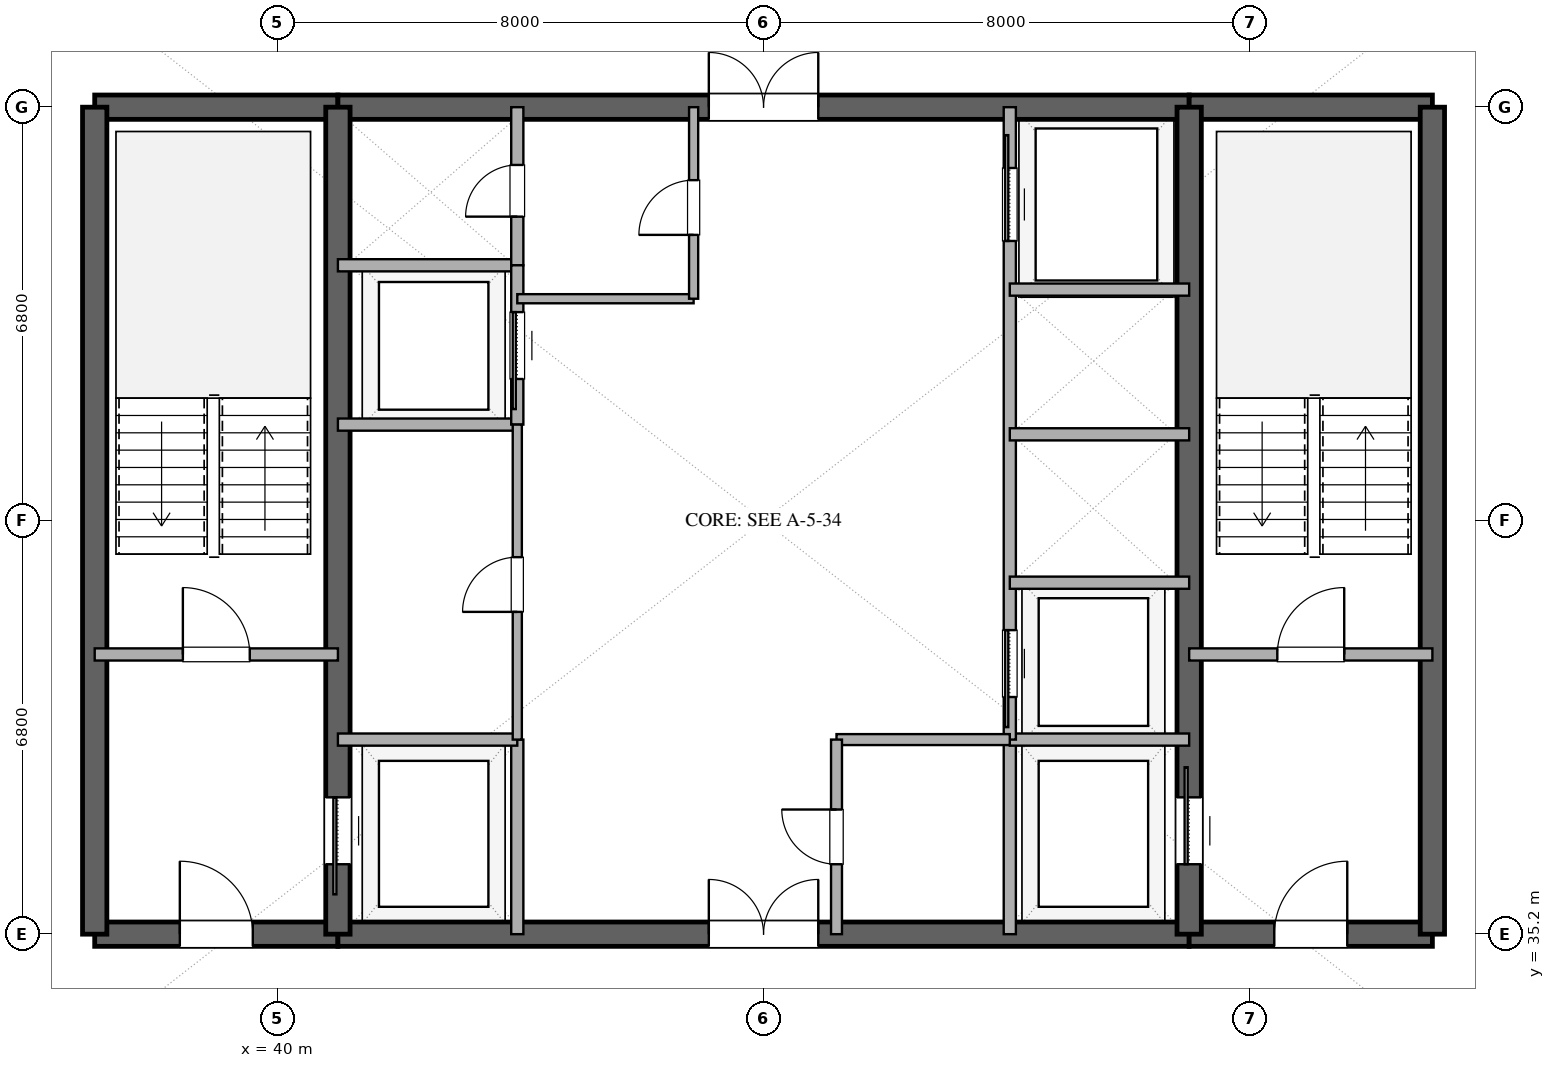
"""IFC4 building model, lengths in metres.
Left out: names, types, materials, properties, quantities, classifications, styles, units other than length and angle.
Written with IfcOpenShell. Run it as: python <this file> out.ifc"""

import sys

from ifc_helpers import new_model, si_unit, direction, frame, frame_2d, origin, place, context, subcontext, project, spatial, rectangle, extrude, element, fill, save


model = new_model("IFC4")
c1 = context("Model", 3, precision=1e-05, world=origin(), true_north=direction((0.0, 1.0)))
c2 = subcontext(c1, "Body", "Model", "MODEL_VIEW")
j1 = project(units=[si_unit("LENGTHUNIT", "METRE"), si_unit("PLANEANGLEUNIT", "RADIAN")], contexts=[c1])
p1 = place(None, origin())
s1 = spatial("IfcSite", under=j1, at=p1, CompositionType="ELEMENT")
p2 = place(p1, origin())
s2 = spatial("IfcBuilding", under=s1, at=p2, CompositionType="ELEMENT")
p3 = place(p2, frame((0.0, 0.0, 228.0)))
s3 = spatial("IfcBuildingStorey", under=s2, at=p3, CompositionType="ELEMENT", Elevation=228.0)
p4 = place(p3, frame((37.0, 35.2, 0.0), z_axis=(0.0, 0.0, 1.0), x_axis=(1.0, 0.0, 0.0)))
e1 = element("IfcWall", 1, at=p4, inside=s3, PredefinedType="SHEAR", context=c2, shape_type="SweptSolid", body=[
    extrude(rectangle(XDim=4.0, YDim=0.4, at=frame_2d((2.0, 0.0))), origin(), (0.0, 0.0, 1.0), 3.36),
])
p5 = place(p4, frame((1.4, 0.0, 0.0)))
e2 = element("IfcOpeningElement", 2, at=p5, cuts=e1, PredefinedType="OPENING", context=c2, shape_type="SweptSolid", body=[
    extrude(rectangle(XDim=1.2, YDim=2.15, at=frame_2d((0.6, 1.075))), frame((0.0, 0.21, 0.0), z_axis=(0.0, -1.0, 0.0), x_axis=(1.0, 0.0, 0.0)), (0.0, 0.0, 1.0), 0.42),
])
p6 = place(p3, frame((41.0, 35.2, 0.0), z_axis=(0.0, 0.0, 1.0), x_axis=(1.0, 0.0, 0.0)))
e3 = element("IfcWall", 3, at=p6, inside=s3, PredefinedType="SHEAR", context=c2, shape_type="SweptSolid", body=[
    extrude(rectangle(XDim=14.0, YDim=0.4, at=frame_2d((7.0, 0.0))), origin(), (0.0, 0.0, 1.0), 3.36),
])
p7 = place(p6, frame((6.1, 0.0, 0.0)))
e4 = element("IfcOpeningElement", 4, at=p7, cuts=e3, PredefinedType="OPENING", context=c2, shape_type="SweptSolid", body=[
    extrude(rectangle(XDim=1.8, YDim=2.25, at=frame_2d((0.9, 1.125))), frame((0.0, 0.21, 0.0), z_axis=(0.0, -1.0, 0.0), x_axis=(1.0, 0.0, 0.0)), (0.0, 0.0, 1.0), 0.42),
])
p8 = place(p3, frame((55.0, 35.2, 0.0), z_axis=(0.0, 0.0, 1.0), x_axis=(1.0, 0.0, 0.0)))
e5 = element("IfcWall", 5, at=p8, inside=s3, PredefinedType="SHEAR", context=c2, shape_type="SweptSolid", body=[
    extrude(rectangle(XDim=4.0, YDim=0.4, at=frame_2d((2.0, 0.0))), origin(), (0.0, 0.0, 1.0), 3.36),
])
p9 = place(p8, frame((1.4, 0.0, 0.0)))
e6 = element("IfcOpeningElement", 6, at=p9, cuts=e5, PredefinedType="OPENING", context=c2, shape_type="SweptSolid", body=[
    extrude(rectangle(XDim=1.2, YDim=2.15, at=frame_2d((0.6, 1.075))), frame((0.0, 0.21, 0.0), z_axis=(0.0, -1.0, 0.0), x_axis=(1.0, 0.0, 0.0)), (0.0, 0.0, 1.0), 0.42),
])
p10 = place(p3, frame((37.0, 48.8, 0.0), z_axis=(0.0, 0.0, 1.0), x_axis=(1.0, 0.0, 0.0)))
e7 = element("IfcWall", 7, at=p10, inside=s3, PredefinedType="SHEAR", context=c2, shape_type="SweptSolid", body=[
    extrude(rectangle(XDim=4.0, YDim=0.4, at=frame_2d((2.0, 0.0))), origin(), (0.0, 0.0, 1.0), 3.36),
])
p11 = place(p3, frame((41.0, 48.8, 0.0), z_axis=(0.0, 0.0, 1.0), x_axis=(1.0, 0.0, 0.0)))
e8 = element("IfcWall", 8, at=p11, inside=s3, PredefinedType="SHEAR", context=c2, shape_type="SweptSolid", body=[
    extrude(rectangle(XDim=14.0, YDim=0.4, at=frame_2d((7.0, 0.0))), origin(), (0.0, 0.0, 1.0), 3.36),
])
p12 = place(p11, frame((6.1, 0.0, 0.0)))
e9 = element("IfcOpeningElement", 9, at=p12, cuts=e8, PredefinedType="OPENING", context=c2, shape_type="SweptSolid", body=[
    extrude(rectangle(XDim=1.8, YDim=2.25, at=frame_2d((0.9, 1.125))), frame((0.0, 0.21, 0.0), z_axis=(0.0, -1.0, 0.0), x_axis=(1.0, 0.0, 0.0)), (0.0, 0.0, 1.0), 0.42),
])
p13 = place(p3, frame((55.0, 48.8, 0.0), z_axis=(0.0, 0.0, 1.0), x_axis=(1.0, 0.0, 0.0)))
e10 = element("IfcWall", 10, at=p13, inside=s3, PredefinedType="SHEAR", context=c2, shape_type="SweptSolid", body=[
    extrude(rectangle(XDim=4.0, YDim=0.4, at=frame_2d((2.0, 0.0))), origin(), (0.0, 0.0, 1.0), 3.36),
])
for number, where, z_axis, x_axis in (
    (11, (37.0, 35.2, 0.0), (0.0, 0.0, 1.0), (0.0, 1.0, 0.0)),
    (12, (59.0, 35.2, 0.0), (0.0, 0.0, 1.0), (0.0, 1.0, 0.0)),
):
    element("IfcWall", number, at=place(p3, frame(where, z_axis=z_axis, x_axis=x_axis)), inside=s3, PredefinedType="SHEAR", context=c2, shape_type="SweptSolid", body=[
        extrude(rectangle(XDim=13.6, YDim=0.4, at=frame_2d((6.8, 0.0))), origin(), (0.0, 0.0, 1.0), 3.36),
    ])
p14 = place(p3, frame((41.0, 35.2, 0.0), z_axis=(0.0, 0.0, 1.0), x_axis=(0.0, 1.0, 0.0)))
e13 = element("IfcWall", 13, at=p14, inside=s3, PredefinedType="SHEAR", context=c2, shape_type="SweptSolid", body=[
    extrude(rectangle(XDim=13.6, YDim=0.4, at=frame_2d((6.8, 0.0))), origin(), (0.0, 0.0, 1.0), 3.36),
])
p15 = place(p14, frame((1.15, 0.0, 0.0)))
e14 = element("IfcOpeningElement", 14, at=p15, cuts=e13, PredefinedType="OPENING", context=c2, shape_type="SweptSolid", body=[
    extrude(rectangle(XDim=1.1, YDim=2.2, at=frame_2d((0.55, 1.1))), frame((0.0, 0.21, 0.0), z_axis=(0.0, -1.0, 0.0), x_axis=(1.0, 0.0, 0.0)), (0.0, 0.0, 1.0), 0.42),
])
p16 = place(p3, frame((55.0, 35.2, 0.0), z_axis=(0.0, 0.0, 1.0), x_axis=(0.0, 1.0, 0.0)))
e15 = element("IfcWall", 15, at=p16, inside=s3, PredefinedType="SHEAR", context=c2, shape_type="SweptSolid", body=[
    extrude(rectangle(XDim=13.6, YDim=0.4, at=frame_2d((6.8, 0.0))), origin(), (0.0, 0.0, 1.0), 3.36),
])
p17 = place(p16, frame((1.15, 0.0, 0.0)))
e16 = element("IfcOpeningElement", 16, at=p17, cuts=e15, PredefinedType="OPENING", context=c2, shape_type="SweptSolid", body=[
    extrude(rectangle(XDim=1.1, YDim=2.2, at=frame_2d((0.55, 1.1))), frame((0.0, 0.21, 0.0), z_axis=(0.0, -1.0, 0.0), x_axis=(1.0, 0.0, 0.0)), (0.0, 0.0, 1.0), 0.42),
])
p18 = place(p3, frame((37.0, 39.8, 0.0), z_axis=(0.0, 0.0, 1.0), x_axis=(1.0, 0.0, 0.0)))
e17 = element("IfcWall", 17, at=p18, inside=s3, PredefinedType="SOLIDWALL", context=c2, shape_type="SweptSolid", body=[
    extrude(rectangle(XDim=4.0, YDim=0.2, at=frame_2d((2.0, 0.0))), origin(), (0.0, 0.0, 1.0), 2.72),
])
p19 = place(p18, frame((1.45, 0.0, 0.0)))
e18 = element("IfcOpeningElement", 18, at=p19, cuts=e17, PredefinedType="OPENING", context=c2, shape_type="SweptSolid", body=[
    extrude(rectangle(XDim=1.1, YDim=2.15, at=frame_2d((0.55, 1.075))), frame((0.0, 0.11, 0.0), z_axis=(0.0, -1.0, 0.0), x_axis=(1.0, 0.0, 0.0)), (0.0, 0.0, 1.0), 0.22),
])
p20 = place(p3, frame((55.0, 39.8, 0.0), z_axis=(0.0, 0.0, 1.0), x_axis=(1.0, 0.0, 0.0)))
e19 = element("IfcWall", 19, at=p20, inside=s3, PredefinedType="SOLIDWALL", context=c2, shape_type="SweptSolid", body=[
    extrude(rectangle(XDim=4.0, YDim=0.2, at=frame_2d((2.0, 0.0))), origin(), (0.0, 0.0, 1.0), 2.72),
])
p21 = place(p20, frame((1.45, 0.0, 0.0)))
e20 = element("IfcOpeningElement", 20, at=p21, cuts=e19, PredefinedType="OPENING", context=c2, shape_type="SweptSolid", body=[
    extrude(rectangle(XDim=1.1, YDim=2.15, at=frame_2d((0.55, 1.075))), frame((0.0, 0.11, 0.0), z_axis=(0.0, -1.0, 0.0), x_axis=(1.0, 0.0, 0.0)), (0.0, 0.0, 1.0), 0.22),
])
p22 = place(p3, frame((43.95, 35.2, 0.0), z_axis=(0.0, 0.0, 1.0), x_axis=(0.0, 1.0, 0.0)))
e21 = element("IfcWall", 21, at=p22, inside=s3, PredefinedType="SOLIDWALL", context=c2, shape_type="SweptSolid", body=[
    extrude(rectangle(XDim=3.2, YDim=0.2, at=frame_2d((1.6, 0.0))), origin(), (0.0, 0.0, 1.0), 2.72),
])
p23 = place(p3, frame((41.0, 38.4, 0.0), z_axis=(0.0, 0.0, 1.0), x_axis=(1.0, 0.0, 0.0)))
e22 = element("IfcWall", 22, at=p23, inside=s3, PredefinedType="SOLIDWALL", context=c2, shape_type="SweptSolid", body=[
    extrude(rectangle(XDim=2.95, YDim=0.2, at=frame_2d((1.475, 0.0))), origin(), (0.0, 0.0, 1.0), 2.72),
])
p24 = place(p3, frame((52.05, 35.2, 0.0), z_axis=(0.0, 0.0, 1.0), x_axis=(0.0, 1.0, 0.0)))
e23 = element("IfcWall", 23, at=p24, inside=s3, PredefinedType="SOLIDWALL", context=c2, shape_type="SweptSolid", body=[
    extrude(rectangle(XDim=3.2, YDim=0.2, at=frame_2d((1.6, 0.0))), origin(), (0.0, 0.0, 1.0), 2.72),
])
for number, where, z_axis, x_axis in (
    (24, (52.05, 38.4, 0.0), (0.0, 0.0, 1.0), (1.0, 0.0, 0.0)),
    (25, (41.0, 46.2, 0.0), (0.0, 0.0, 1.0), (1.0, 0.0, 0.0)),
):
    element("IfcWall", number, at=place(p3, frame(where, z_axis=z_axis, x_axis=x_axis)), inside=s3, PredefinedType="SOLIDWALL", context=c2, shape_type="SweptSolid", body=[
        extrude(rectangle(XDim=2.95, YDim=0.2, at=frame_2d((1.475, 0.0))), origin(), (0.0, 0.0, 1.0), 2.72),
    ])
p25 = place(p3, frame((43.95, 46.2, 0.0), z_axis=(0.0, 0.0, 1.0), x_axis=(0.0, 1.0, 0.0)))
e26 = element("IfcWall", 26, at=p25, inside=s3, PredefinedType="SOLIDWALL", context=c2, shape_type="SweptSolid", body=[
    extrude(rectangle(XDim=2.6, YDim=0.2, at=frame_2d((1.3, 0.0))), origin(), (0.0, 0.0, 1.0), 2.72),
])
p26 = place(p25, frame((0.8, 0.0, 0.0)))
e27 = element("IfcOpeningElement", 27, at=p26, cuts=e26, PredefinedType="OPENING", context=c2, shape_type="SweptSolid", body=[
    extrude(rectangle(XDim=0.85, YDim=2.15, at=frame_2d((0.425, 1.075))), frame((0.0, 0.11, 0.0), z_axis=(0.0, -1.0, 0.0), x_axis=(1.0, 0.0, 0.0)), (0.0, 0.0, 1.0), 0.22),
])
p27 = place(p3, frame((41.0, 43.58, 0.0), z_axis=(0.0, 0.0, 1.0), x_axis=(1.0, 0.0, 0.0)))
e28 = element("IfcWall", 28, at=p27, inside=s3, PredefinedType="SOLIDWALL", context=c2, shape_type="SweptSolid", body=[
    extrude(rectangle(XDim=2.95, YDim=0.2, at=frame_2d((1.475, 0.0))), origin(), (0.0, 0.0, 1.0), 2.72),
])
p28 = place(p3, frame((43.95, 43.58, 0.0), z_axis=(0.0, 0.0, 1.0), x_axis=(0.0, 1.0, 0.0)))
e29 = element("IfcWall", 29, at=p28, inside=s3, PredefinedType="SOLIDWALL", context=c2, shape_type="SweptSolid", body=[
    extrude(rectangle(XDim=2.62, YDim=0.2, at=frame_2d((1.31, 0.0))), origin(), (0.0, 0.0, 1.0), 2.72),
])
p29 = place(p28, frame((0.75, 0.0, 0.0)))
e30 = element("IfcOpeningElement", 30, at=p29, cuts=e29, PredefinedType="OPENING", context=c2, shape_type="SweptSolid", body=[
    extrude(rectangle(XDim=1.1, YDim=2.2, at=frame_2d((0.55, 1.1))), frame((0.0, 0.11, 0.0), z_axis=(0.0, -1.0, 0.0), x_axis=(1.0, 0.0, 0.0)), (0.0, 0.0, 1.0), 0.22),
])
p30 = place(p3, frame((43.95, 38.4, 0.0), z_axis=(0.0, 0.0, 1.0), x_axis=(0.0, 1.0, 0.0)))
e31 = element("IfcWall", 31, at=p30, inside=s3, PredefinedType="PARTITIONING", context=c2, shape_type="SweptSolid", body=[
    extrude(rectangle(XDim=5.18, YDim=0.15, at=frame_2d((2.59, 0.0))), origin(), (0.0, 0.0, 1.0), 2.72),
])
p31 = place(p30, frame((2.1, 0.0, 0.0)))
e32 = element("IfcOpeningElement", 32, at=p31, cuts=e31, PredefinedType="OPENING", context=c2, shape_type="SweptSolid", body=[
    extrude(rectangle(XDim=0.9, YDim=2.15, at=frame_2d((0.45, 1.075))), frame((0.0, 0.085, 0.0), z_axis=(0.0, -1.0, 0.0), x_axis=(1.0, 0.0, 0.0)), (0.0, 0.0, 1.0), 0.17),
])
p32 = place(p3, frame((52.05, 38.4, 0.0), z_axis=(0.0, 0.0, 1.0), x_axis=(0.0, 1.0, 0.0)))
e33 = element("IfcWall", 33, at=p32, inside=s3, PredefinedType="SOLIDWALL", context=c2, shape_type="SweptSolid", body=[
    extrude(rectangle(XDim=10.4, YDim=0.2, at=frame_2d((5.2, 0.0))), origin(), (0.0, 0.0, 1.0), 2.72),
])
p33 = place(p32, frame((0.7, 0.0, 0.0)))
e34 = element("IfcOpeningElement", 34, at=p33, cuts=e33, PredefinedType="OPENING", context=c2, shape_type="SweptSolid", body=[
    extrude(rectangle(XDim=1.1, YDim=2.2, at=frame_2d((0.55, 1.1))), frame((0.0, 0.11, 0.0), z_axis=(0.0, -1.0, 0.0), x_axis=(1.0, 0.0, 0.0)), (0.0, 0.0, 1.0), 0.22),
])
p34 = place(p32, frame((8.2, 0.0, 0.0)))
e35 = element("IfcOpeningElement", 35, at=p34, cuts=e33, PredefinedType="OPENING", context=c2, shape_type="SweptSolid", body=[
    extrude(rectangle(XDim=1.2, YDim=2.2, at=frame_2d((0.6, 1.1))), frame((0.0, 0.11, 0.0), z_axis=(0.0, -1.0, 0.0), x_axis=(1.0, 0.0, 0.0)), (0.0, 0.0, 1.0), 0.22),
])
for number, where, z_axis, x_axis in (
    (36, (52.05, 40.98, 0.0), (0.0, 0.0, 1.0), (1.0, 0.0, 0.0)),
    (37, (52.05, 43.42, 0.0), (0.0, 0.0, 1.0), (1.0, 0.0, 0.0)),
    (38, (52.05, 45.8, 0.0), (0.0, 0.0, 1.0), (1.0, 0.0, 0.0)),
):
    element("IfcWall", number, at=place(p3, frame(where, z_axis=z_axis, x_axis=x_axis)), inside=s3, PredefinedType="SOLIDWALL", context=c2, shape_type="SweptSolid", body=[
        extrude(rectangle(XDim=2.95, YDim=0.2, at=frame_2d((1.475, 0.0))), origin(), (0.0, 0.0, 1.0), 2.72),
    ])
p35 = place(p3, frame((43.95, 45.65, 0.0), z_axis=(0.0, 0.0, 1.0), x_axis=(1.0, 0.0, 0.0)))
e39 = element("IfcWall", 39, at=p35, inside=s3, PredefinedType="PARTITIONING", context=c2, shape_type="SweptSolid", body=[
    extrude(rectangle(XDim=2.9, YDim=0.15, at=frame_2d((1.45, 0.0))), origin(), (0.0, 0.0, 1.0), 2.72),
])
p36 = place(p3, frame((46.85, 45.65, 0.0), z_axis=(0.0, 0.0, 1.0), x_axis=(0.0, 1.0, 0.0)))
e40 = element("IfcWall", 40, at=p36, inside=s3, PredefinedType="PARTITIONING", context=c2, shape_type="SweptSolid", body=[
    extrude(rectangle(XDim=3.15, YDim=0.15, at=frame_2d((1.575, 0.0))), origin(), (0.0, 0.0, 1.0), 2.72),
])
p37 = place(p36, frame((1.05, 0.0, 0.0)))
e41 = element("IfcOpeningElement", 41, at=p37, cuts=e40, PredefinedType="OPENING", context=c2, shape_type="SweptSolid", body=[
    extrude(rectangle(XDim=0.9, YDim=2.15, at=frame_2d((0.45, 1.075))), frame((0.0, 0.085, 0.0), z_axis=(0.0, -1.0, 0.0), x_axis=(1.0, 0.0, 0.0)), (0.0, 0.0, 1.0), 0.17),
])
p38 = place(p3, frame((49.2, 38.4, 0.0), z_axis=(0.0, 0.0, 1.0), x_axis=(1.0, 0.0, 0.0)))
e42 = element("IfcWall", 42, at=p38, inside=s3, PredefinedType="PLUMBINGWALL", context=c2, shape_type="SweptSolid", body=[
    extrude(rectangle(XDim=2.85, YDim=0.18, at=frame_2d((1.425, 0.0))), origin(), (0.0, 0.0, 1.0), 2.72),
])
p39 = place(p3, frame((49.2, 35.2, 0.0), z_axis=(0.0, 0.0, 1.0), x_axis=(0.0, 1.0, 0.0)))
e43 = element("IfcWall", 43, at=p39, inside=s3, PredefinedType="PLUMBINGWALL", context=c2, shape_type="SweptSolid", body=[
    extrude(rectangle(XDim=3.2, YDim=0.18, at=frame_2d((1.6, 0.0))), origin(), (0.0, 0.0, 1.0), 2.72),
])
p40 = place(p39, frame((1.15, 0.0, 0.0)))
e44 = element("IfcOpeningElement", 44, at=p40, cuts=e43, PredefinedType="OPENING", context=c2, shape_type="SweptSolid", body=[
    extrude(rectangle(XDim=0.9, YDim=2.1, at=frame_2d((0.45, 1.05))), frame((0.0, 0.1, 0.0), z_axis=(0.0, -1.0, 0.0), x_axis=(1.0, 0.0, 0.0)), (0.0, 0.0, 1.0), 0.2),
])
p41 = place(p15, origin())
e45 = element("IfcDoor", 45, at=p41, inside=s3, OperationType="SLIDING_TO_LEFT", PredefinedType="DOOR", context=c2, shape_type="SweptSolid", body=[
    extrude(rectangle(XDim=1.1, YDim=2.2, at=frame_2d((0.55, 1.1))), frame((0.0, 0.025, 0.0), z_axis=(0.0, -1.0, 0.0), x_axis=(1.0, 0.0, 0.0)), (0.0, 0.0, 1.0), 0.05),
])
fill(e14, e45)
p42 = place(p17, origin())
e46 = element("IfcDoor", 46, at=p42, inside=s3, OperationType="SLIDING_TO_RIGHT", PredefinedType="DOOR", context=c2, shape_type="SweptSolid", body=[
    extrude(rectangle(XDim=1.1, YDim=2.2, at=frame_2d((0.55, 1.1))), frame((0.0, 0.025, 0.0), z_axis=(0.0, -1.0, 0.0), x_axis=(1.0, 0.0, 0.0)), (0.0, 0.0, 1.0), 0.05),
])
fill(e16, e46)
p43 = place(p5, origin())
e47 = element("IfcDoor", 47, at=p43, inside=s3, OperationType="SINGLE_SWING_LEFT", PredefinedType="DOOR", context=c2, shape_type="SweptSolid", body=[
    extrude(rectangle(XDim=1.2, YDim=2.15, at=frame_2d((0.6, 1.075))), frame((0.0, 0.025, 0.0), z_axis=(0.0, -1.0, 0.0), x_axis=(1.0, 0.0, 0.0)), (0.0, 0.0, 1.0), 0.05),
])
fill(e2, e47)
p44 = place(p9, origin())
e48 = element("IfcDoor", 48, at=p44, inside=s3, OperationType="SINGLE_SWING_RIGHT", PredefinedType="DOOR", context=c2, shape_type="SweptSolid", body=[
    extrude(rectangle(XDim=1.2, YDim=2.15, at=frame_2d((0.6, 1.075))), frame((0.0, 0.025, 0.0), z_axis=(0.0, -1.0, 0.0), x_axis=(1.0, 0.0, 0.0)), (0.0, 0.0, 1.0), 0.05),
])
fill(e6, e48)
p45 = place(p7, origin())
e49 = element("IfcDoor", 49, at=p45, inside=s3, OperationType="DOUBLE_DOOR_SINGLE_SWING", PredefinedType="DOOR", context=c2, shape_type="SweptSolid", body=[
    extrude(rectangle(XDim=1.8, YDim=2.25, at=frame_2d((0.9, 1.125))), frame((0.0, 0.025, 0.0), z_axis=(0.0, -1.0, 0.0), x_axis=(1.0, 0.0, 0.0)), (0.0, 0.0, 1.0), 0.05),
])
fill(e4, e49)
p46 = place(p12, origin())
e50 = element("IfcDoor", 50, at=p46, inside=s3, OperationType="DOUBLE_DOOR_SINGLE_SWING", PredefinedType="DOOR", context=c2, shape_type="SweptSolid", body=[
    extrude(rectangle(XDim=1.8, YDim=2.25, at=frame_2d((0.9, 1.125))), frame((0.0, 0.025, 0.0), z_axis=(0.0, -1.0, 0.0), x_axis=(1.0, 0.0, 0.0)), (0.0, 0.0, 1.0), 0.05),
])
fill(e9, e50)
p47 = place(p19, origin())
e51 = element("IfcDoor", 51, at=p47, inside=s3, OperationType="SINGLE_SWING_LEFT", PredefinedType="DOOR", context=c2, shape_type="SweptSolid", body=[
    extrude(rectangle(XDim=1.1, YDim=2.15, at=frame_2d((0.55, 1.075))), frame((0.0, 0.025, 0.0), z_axis=(0.0, -1.0, 0.0), x_axis=(1.0, 0.0, 0.0)), (0.0, 0.0, 1.0), 0.05),
])
fill(e18, e51)
p48 = place(p21, origin())
e52 = element("IfcDoor", 52, at=p48, inside=s3, OperationType="SINGLE_SWING_RIGHT", PredefinedType="DOOR", context=c2, shape_type="SweptSolid", body=[
    extrude(rectangle(XDim=1.1, YDim=2.15, at=frame_2d((0.55, 1.075))), frame((0.0, 0.025, 0.0), z_axis=(0.0, -1.0, 0.0), x_axis=(1.0, 0.0, 0.0)), (0.0, 0.0, 1.0), 0.05),
])
fill(e20, e52)
p49 = place(p26, origin())
e53 = element("IfcDoor", 53, at=p49, inside=s3, OperationType="SINGLE_SWING_LEFT", PredefinedType="DOOR", context=c2, shape_type="SweptSolid", body=[
    extrude(rectangle(XDim=0.85, YDim=2.15, at=frame_2d((0.425, 1.075))), frame((0.0, 0.025, 0.0), z_axis=(0.0, -1.0, 0.0), x_axis=(1.0, 0.0, 0.0)), (0.0, 0.0, 1.0), 0.05),
])
fill(e27, e53)
p50 = place(p29, origin())
e54 = element("IfcDoor", 54, at=p50, inside=s3, OperationType="SLIDING_TO_LEFT", PredefinedType="DOOR", context=c2, shape_type="SweptSolid", body=[
    extrude(rectangle(XDim=1.1, YDim=2.2, at=frame_2d((0.55, 1.1))), frame((0.0, 0.025, 0.0), z_axis=(0.0, -1.0, 0.0), x_axis=(1.0, 0.0, 0.0)), (0.0, 0.0, 1.0), 0.05),
])
fill(e30, e54)
p51 = place(p31, origin())
e55 = element("IfcDoor", 55, at=p51, inside=s3, OperationType="SINGLE_SWING_LEFT", PredefinedType="DOOR", context=c2, shape_type="SweptSolid", body=[
    extrude(rectangle(XDim=0.9, YDim=2.15, at=frame_2d((0.45, 1.075))), frame((0.0, 0.025, 0.0), z_axis=(0.0, -1.0, 0.0), x_axis=(1.0, 0.0, 0.0)), (0.0, 0.0, 1.0), 0.05),
])
fill(e32, e55)
p52 = place(p33, origin())
e56 = element("IfcDoor", 56, at=p52, inside=s3, OperationType="SLIDING_TO_LEFT", PredefinedType="DOOR", context=c2, shape_type="SweptSolid", body=[
    extrude(rectangle(XDim=1.1, YDim=2.2, at=frame_2d((0.55, 1.1))), frame((0.0, 0.025, 0.0), z_axis=(0.0, -1.0, 0.0), x_axis=(1.0, 0.0, 0.0)), (0.0, 0.0, 1.0), 0.05),
])
fill(e34, e56)
p53 = place(p34, origin())
e57 = element("IfcDoor", 57, at=p53, inside=s3, OperationType="SLIDING_TO_RIGHT", PredefinedType="DOOR", context=c2, shape_type="SweptSolid", body=[
    extrude(rectangle(XDim=1.2, YDim=2.2, at=frame_2d((0.6, 1.1))), frame((0.0, 0.025, 0.0), z_axis=(0.0, -1.0, 0.0), x_axis=(1.0, 0.0, 0.0)), (0.0, 0.0, 1.0), 0.05),
])
fill(e35, e57)
p54 = place(p37, origin())
e58 = element("IfcDoor", 58, at=p54, inside=s3, OperationType="SINGLE_SWING_LEFT", PredefinedType="DOOR", context=c2, shape_type="SweptSolid", body=[
    extrude(rectangle(XDim=0.9, YDim=2.15, at=frame_2d((0.45, 1.075))), frame((0.0, 0.025, 0.0), z_axis=(0.0, -1.0, 0.0), x_axis=(1.0, 0.0, 0.0)), (0.0, 0.0, 1.0), 0.05),
])
fill(e41, e58)
p55 = place(p40, origin())
e59 = element("IfcDoor", 59, at=p55, inside=s3, OperationType="SINGLE_SWING_RIGHT", PredefinedType="DOOR", context=c2, shape_type="SweptSolid", body=[
    extrude(rectangle(XDim=0.9, YDim=2.1, at=frame_2d((0.45, 1.05))), frame((0.0, 0.025, 0.0), z_axis=(0.0, -1.0, 0.0), x_axis=(1.0, 0.0, 0.0)), (0.0, 0.0, 1.0), 0.05),
])
fill(e44, e59)
save(model, sys.argv[1])
